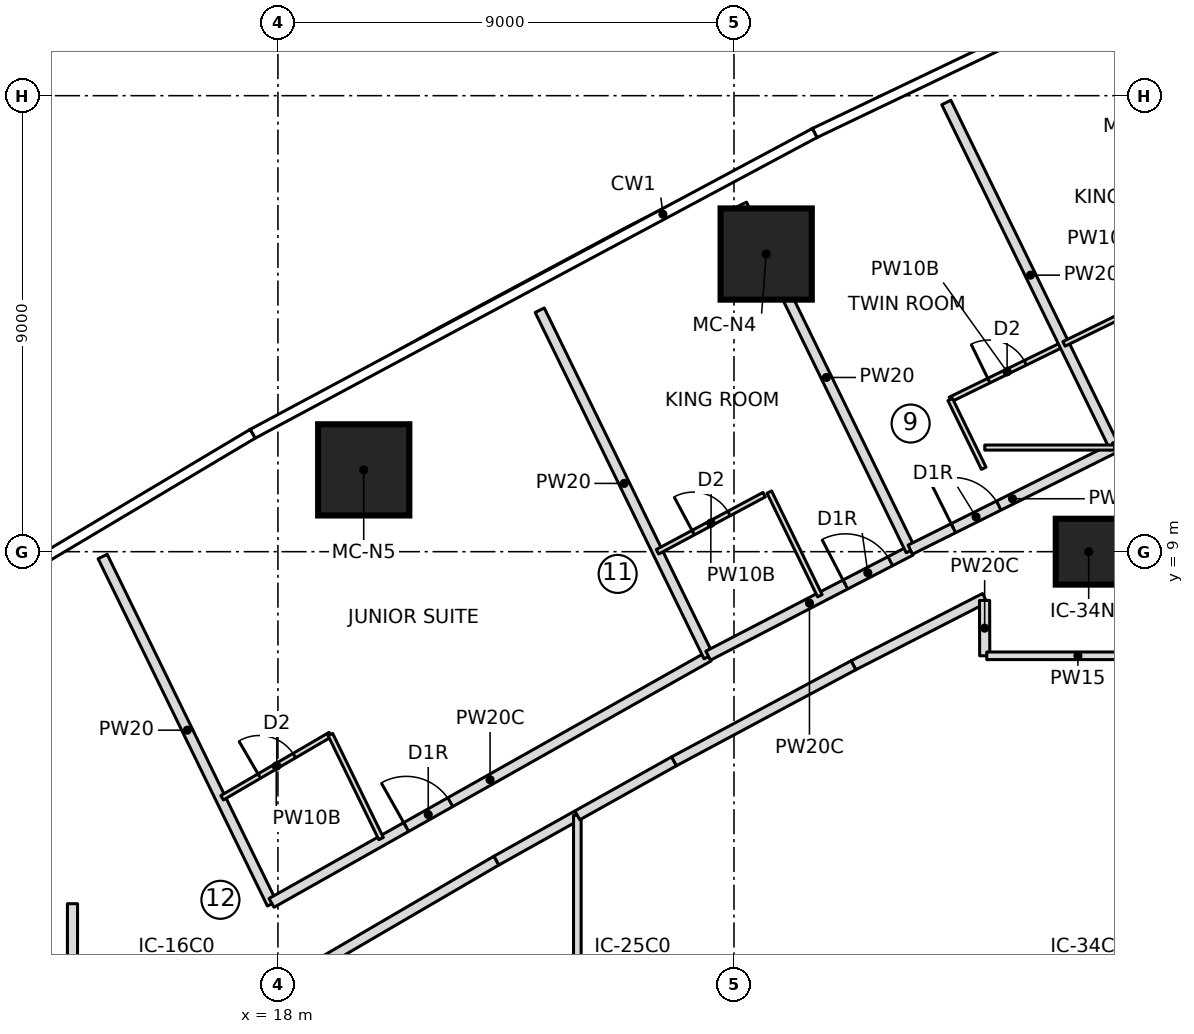
"""IFC4 building model, lengths in metres.
Left out: names, types, materials, properties, quantities, classifications, styles, units other than length and angle.
Written with IfcOpenShell. Run it as: python <this file> out.ifc"""

import sys

from ifc_helpers import new_model, si_unit, direction, frame, frame_2d, origin, origin_2d, place, context, subcontext, project, spatial, rectangle, extrude, element, fill, save


model = new_model("IFC4")
c1 = context("Model", 3, precision=1e-05, world=origin(), true_north=direction((0.0, 1.0)))
c2 = subcontext(c1, "Body", "Model", "MODEL_VIEW")
j1 = project(units=[si_unit("LENGTHUNIT", "METRE"), si_unit("PLANEANGLEUNIT", "RADIAN")], contexts=[c1])
p1 = place(None, origin())
s1 = spatial("IfcSite", under=j1, at=p1, CompositionType="ELEMENT")
p2 = place(p1, origin())
s2 = spatial("IfcBuilding", under=s1, at=p2, CompositionType="ELEMENT")
p3 = place(p2, frame((0.0, 0.0, 39.6)))
s3 = spatial("IfcBuildingStorey", under=s2, at=p3, CompositionType="ELEMENT", Elevation=39.6)
for number, where, z_axis, x_axis in (
    (1, (27.635, 14.874, 0.0), (0.0, 0.0, 1.0), (1.0, 0.0, 0.0)),
    (2, (19.693, 10.615, 0.0), (0.0, 0.0, 1.0), (1.0, 0.0, 0.0)),
):
    element("IfcColumn", number, at=place(p3, frame(where, z_axis=z_axis, x_axis=x_axis)), inside=s3, PredefinedType="COLUMN", context=c2, shape_type="SweptSolid", body=[
        extrude(rectangle(XDim=1.8, YDim=1.8, at=origin_2d()), origin(), (0.0, 0.0, 1.0), 3.55),
    ])
p4 = place(p3, frame((34.0, 9.0, 0.0), z_axis=(0.0, 0.0, 1.0), x_axis=(1.0, 0.0, 0.0)))
e3 = element("IfcColumn", 3, at=p4, inside=s3, PredefinedType="COLUMN", context=c2, shape_type="SweptSolid", body=[
    extrude(rectangle(XDim=1.3, YDim=1.3, at=origin_2d()), origin(), (0.0, 0.0, 1.0), 3.55),
])
p5 = place(p3, frame((17.882, 2.05, 0.0), z_axis=(0.0, 0.0, 1.0), x_axis=(-0.438213564788, 0.898870887078, 0.0)))
e4 = element("IfcWall", 4, at=p5, inside=s3, PredefinedType="PARTITIONING", context=c2, shape_type="SweptSolid", body=[
    extrude(rectangle(XDim=7.625, YDim=0.2, at=frame_2d((3.813, 0.0))), origin(), (0.0, 0.0, 1.0), 3.25),
])
p6 = place(p3, frame((17.874, 2.068, 0.0), z_axis=(0.0, 0.0, 1.0), x_axis=(0.871165632804, 0.490989246544, 0.0)))
e5 = element("IfcWall", 5, at=p6, inside=s3, PredefinedType="PARTITIONING", context=c2, shape_type="SweptSolid", body=[
    extrude(rectangle(XDim=9.901, YDim=0.2, at=frame_2d((4.951, 0.0))), origin(), (0.0, 0.0, 1.0), 3.25),
])
p7 = place(p6, frame((3.05, 0.0, 0.0)))
e6 = element("IfcOpeningElement", 6, at=p7, cuts=e5, PredefinedType="OPENING", context=c2, shape_type="SweptSolid", body=[
    extrude(rectangle(XDim=1.0, YDim=2.1, at=frame_2d((0.5, 1.05))), frame((0.0, 0.11, 0.0), z_axis=(0.0, -1.0, 0.0), x_axis=(1.0, 0.0, 0.0)), (0.0, 0.0, 1.0), 0.22),
])
p8 = place(p3, frame((16.898, 4.144, 0.0), z_axis=(0.0, 0.0, 1.0), x_axis=(0.863707305865, 0.503993739837, 0.0)))
e7 = element("IfcWall", 7, at=p8, inside=s3, PredefinedType="PARTITIONING", context=c2, shape_type="SweptSolid", body=[
    extrude(rectangle(XDim=2.474, YDim=0.1, at=frame_2d((1.237, 0.0))), origin(), (0.0, 0.0, 1.0), 3.25),
])
p9 = place(p8, frame((0.85, 0.0, 0.0)))
e8 = element("IfcOpeningElement", 8, at=p9, cuts=e7, PredefinedType="OPENING", context=c2, shape_type="SweptSolid", body=[
    extrude(rectangle(XDim=0.8, YDim=2.1, at=frame_2d((0.4, 1.05))), frame((0.0, 0.06, 0.0), z_axis=(0.0, -1.0, 0.0), x_axis=(1.0, 0.0, 0.0)), (0.0, 0.0, 1.0), 0.12),
])
p10 = place(p3, frame((19.035, 5.39, 0.0), z_axis=(0.0, 0.0, 1.0), x_axis=(0.438122322582, -0.898915363344, 0.0)))
e9 = element("IfcWall", 9, at=p10, inside=s3, PredefinedType="PARTITIONING", context=c2, shape_type="SweptSolid", body=[
    extrude(rectangle(XDim=2.283, YDim=0.1, at=frame_2d((1.142, 0.0))), origin(), (0.0, 0.0, 1.0), 3.25),
])
p11 = place(p3, frame((26.499, 6.929, 0.0), z_axis=(0.0, 0.0, 1.0), x_axis=(-0.438215539964, 0.898869924146, 0.0)))
e10 = element("IfcWall", 10, at=p11, inside=s3, PredefinedType="PARTITIONING", context=c2, shape_type="SweptSolid", body=[
    extrude(rectangle(XDim=7.605, YDim=0.2, at=frame_2d((3.803, 0.0))), origin(), (0.0, 0.0, 1.0), 3.25),
])
p12 = place(p3, frame((26.49, 6.948, 0.0), z_axis=(0.0, 0.0, 1.0), x_axis=(0.887638836985, 0.460540220911, 0.0)))
e11 = element("IfcWall", 11, at=p12, inside=s3, PredefinedType="PARTITIONING", context=c2, shape_type="SweptSolid", body=[
    extrude(rectangle(XDim=4.504, YDim=0.2, at=frame_2d((2.252, 0.0))), origin(), (0.0, 0.0, 1.0), 3.25),
])
p13 = place(p12, frame((3.05, 0.0, 0.0)))
e12 = element("IfcOpeningElement", 12, at=p13, cuts=e11, PredefinedType="OPENING", context=c2, shape_type="SweptSolid", body=[
    extrude(rectangle(XDim=1.0, YDim=2.1, at=frame_2d((0.5, 1.05))), frame((0.0, 0.11, 0.0), z_axis=(0.0, -1.0, 0.0), x_axis=(1.0, 0.0, 0.0)), (0.0, 0.0, 1.0), 0.22),
])
p14 = place(p3, frame((25.49, 8.998, 0.0), z_axis=(0.0, 0.0, 1.0), x_axis=(0.881666905428, 0.471872300388, 0.0)))
e13 = element("IfcWall", 13, at=p14, inside=s3, PredefinedType="PARTITIONING", context=c2, shape_type="SweptSolid", body=[
    extrude(rectangle(XDim=2.387, YDim=0.1, at=frame_2d((1.194, 0.0))), origin(), (0.0, 0.0, 1.0), 3.25),
])
p15 = place(p14, frame((0.8, 0.0, 0.0)))
e14 = element("IfcOpeningElement", 14, at=p15, cuts=e13, PredefinedType="OPENING", context=c2, shape_type="SweptSolid", body=[
    extrude(rectangle(XDim=0.8, YDim=2.1, at=frame_2d((0.4, 1.05))), frame((0.0, 0.06, 0.0), z_axis=(0.0, -1.0, 0.0), x_axis=(1.0, 0.0, 0.0)), (0.0, 0.0, 1.0), 0.12),
])
p16 = place(p3, frame((27.697, 10.177, 0.0), z_axis=(0.0, 0.0, 1.0), x_axis=(0.438229314017, -0.898863208912, 0.0)))
e15 = element("IfcWall", 15, at=p16, inside=s3, PredefinedType="PARTITIONING", context=c2, shape_type="SweptSolid", body=[
    extrude(rectangle(XDim=2.277, YDim=0.1, at=frame_2d((1.139, 0.0))), origin(), (0.0, 0.0, 1.0), 3.25),
])
p17 = place(p3, frame((30.489, 9.022, 0.0), z_axis=(0.0, 0.0, 1.0), x_axis=(-0.43822365664, 0.898865967072, 0.0)))
e16 = element("IfcWall", 16, at=p17, inside=s3, PredefinedType="PARTITIONING", context=c2, shape_type="SweptSolid", body=[
    extrude(rectangle(XDim=7.601, YDim=0.2, at=frame_2d((3.801, 0.0))), origin(), (0.0, 0.0, 1.0), 3.25),
])
p18 = place(p3, frame((30.48, 9.04, 0.0), z_axis=(0.0, 0.0, 1.0), x_axis=(0.894989913054, 0.446086376761, 0.0)))
e17 = element("IfcWall", 17, at=p18, inside=s3, PredefinedType="PARTITIONING", context=c2, shape_type="SweptSolid", body=[
    extrude(rectangle(XDim=4.506, YDim=0.2, at=frame_2d((2.253, 0.0))), origin(), (0.0, 0.0, 1.0), 3.25),
])
p19 = place(p18, frame((0.95, 0.0, 0.0)))
e18 = element("IfcOpeningElement", 18, at=p19, cuts=e17, PredefinedType="OPENING", context=c2, shape_type="SweptSolid", body=[
    extrude(rectangle(XDim=1.0, YDim=2.1, at=frame_2d((0.5, 1.05))), frame((0.0, 0.11, 0.0), z_axis=(0.0, -1.0, 0.0), x_axis=(1.0, 0.0, 0.0)), (0.0, 0.0, 1.0), 0.22),
])
p20 = place(p3, frame((31.267, 12.003, 0.0), z_axis=(0.0, 0.0, 1.0), x_axis=(0.89845285455, 0.439070003702, 0.0)))
e19 = element("IfcWall", 19, at=p20, inside=s3, PredefinedType="PARTITIONING", context=c2, shape_type="SweptSolid", body=[
    extrude(rectangle(XDim=2.5, YDim=0.1, at=frame_2d((1.25, 0.0))), origin(), (0.0, 0.0, 1.0), 3.25),
])
p21 = place(p20, frame((0.85, 0.0, 0.0)))
e20 = element("IfcOpeningElement", 20, at=p21, cuts=e19, PredefinedType="OPENING", context=c2, shape_type="SweptSolid", body=[
    extrude(rectangle(XDim=0.8, YDim=2.1, at=frame_2d((0.4, 1.05))), frame((0.0, 0.06, 0.0), z_axis=(0.0, -1.0, 0.0), x_axis=(1.0, 0.0, 0.0)), (0.0, 0.0, 1.0), 0.12),
])
p22 = place(p3, frame((31.929, 10.646, 0.0), z_axis=(0.0, 0.0, 1.0), x_axis=(-0.438136931394, 0.898908243008, 0.0)))
e21 = element("IfcWall", 21, at=p22, inside=s3, PredefinedType="PARTITIONING", context=c2, shape_type="SweptSolid", body=[
    extrude(rectangle(XDim=1.51, YDim=0.1, at=frame_2d((0.755, 0.0))), origin(), (0.0, 0.0, 1.0), 3.25),
])
p23 = place(p3, frame((34.513, 11.05, 0.0), z_axis=(0.0, 0.0, 1.0), x_axis=(-0.438187612283, 0.898883538865, 0.0)))
e22 = element("IfcWall", 22, at=p23, inside=s3, PredefinedType="PARTITIONING", context=c2, shape_type="SweptSolid", body=[
    extrude(rectangle(XDim=7.582, YDim=0.2, at=frame_2d((3.791, 0.0))), origin(), (0.0, 0.0, 1.0), 3.25),
])
p24 = place(p3, frame((38.585, 12.981, 0.0), z_axis=(0.0, 0.0, 1.0), x_axis=(-0.903706948966, -0.428151550727, 0.0)))
e23 = element("IfcWall", 23, at=p24, inside=s3, PredefinedType="PARTITIONING", context=c2, shape_type="SweptSolid", body=[
    extrude(rectangle(XDim=4.506, YDim=0.2, at=frame_2d((2.253, 0.0))), origin(), (0.0, 0.0, 1.0), 3.25),
])
p25 = place(p24, frame((0.5, 0.0, 0.0)))
e24 = element("IfcOpeningElement", 24, at=p25, cuts=e23, PredefinedType="OPENING", context=c2, shape_type="SweptSolid", body=[
    extrude(rectangle(XDim=1.0, YDim=2.1, at=frame_2d((0.5, 1.05))), frame((0.0, 0.11, 0.0), z_axis=(0.0, -1.0, 0.0), x_axis=(1.0, 0.0, 0.0)), (0.0, 0.0, 1.0), 0.22),
])
p26 = place(p3, frame((33.513, 13.101, 0.0), z_axis=(0.0, 0.0, 1.0), x_axis=(0.898338680123, 0.439303557685, 0.0)))
e25 = element("IfcWall", 25, at=p26, inside=s3, PredefinedType="PARTITIONING", context=c2, shape_type="SweptSolid", body=[
    extrude(rectangle(XDim=1.547, YDim=0.1, at=frame_2d((0.773, 0.0))), origin(), (0.0, 0.0, 1.0), 3.25),
])
p27 = place(p3, frame((18.844, 0.879, 0.0), z_axis=(0.0, 0.0, 1.0), x_axis=(0.863710538269, 0.503988200341, 0.0)))
e26 = element("IfcWall", 26, at=p27, inside=s3, PredefinedType="PARTITIONING", context=c2, shape_type="SweptSolid", body=[
    extrude(rectangle(XDim=4.016, YDim=0.2, at=frame_2d((2.008, 0.0))), origin(), (0.0, 0.0, 1.0), 3.25),
])
p28 = place(p3, frame((22.312, 2.903, 0.0), z_axis=(0.0, 0.0, 1.0), x_axis=(0.872813072418, 0.48805464921, 0.0)))
e27 = element("IfcWall", 27, at=p28, inside=s3, PredefinedType="PARTITIONING", context=c2, shape_type="SweptSolid", body=[
    extrude(rectangle(XDim=1.829, YDim=0.2, at=frame_2d((0.915, 0.0))), origin(), (0.0, 0.0, 1.0), 3.25),
])
p29 = place(p3, frame((23.909, -3.796, 0.0), z_axis=(0.0, 0.0, 1.0), x_axis=(0.0, 1.0, 0.0)))
e28 = element("IfcWall", 28, at=p29, inside=s3, PredefinedType="PARTITIONING", context=c2, shape_type="SweptSolid", body=[
    extrude(rectangle(XDim=7.592, YDim=0.15, at=frame_2d((3.796, 0.0))), origin(), (0.0, 0.0, 1.0), 3.25),
])
p30 = place(p3, frame((29.357, 6.758, 0.0), z_axis=(0.0, 0.0, 1.0), x_axis=(0.890213377055, 0.455543788579, 0.0)))
e29 = element("IfcWall", 29, at=p30, inside=s3, PredefinedType="PARTITIONING", context=c2, shape_type="SweptSolid", body=[
    extrude(rectangle(XDim=2.912, YDim=0.2, at=frame_2d((1.456, 0.0))), origin(), (0.0, 0.0, 1.0), 3.25),
])
p31 = place(p3, frame((23.909, 3.796, 0.0), z_axis=(0.0, 0.0, 1.0), x_axis=(0.872789592901, 0.48809663646, 0.0)))
e30 = element("IfcWall", 30, at=p31, inside=s3, PredefinedType="PARTITIONING", context=c2, shape_type="SweptSolid", body=[
    extrude(rectangle(XDim=2.186, YDim=0.2, at=frame_2d((1.093, 0.0))), origin(), (0.0, 0.0, 1.0), 3.25),
])
p32 = place(p3, frame((25.817, 4.863, 0.0), z_axis=(0.0, 0.0, 1.0), x_axis=(0.881655245922, 0.471894084874, 0.0)))
e31 = element("IfcWall", 31, at=p32, inside=s3, PredefinedType="PARTITIONING", context=c2, shape_type="SweptSolid", body=[
    extrude(rectangle(XDim=4.016, YDim=0.2, at=frame_2d((2.008, 0.0))), origin(), (0.0, 0.0, 1.0), 3.25),
])
p33 = place(p3, frame((34.51, 11.055, 0.0), z_axis=(0.0, 0.0, 1.0), x_axis=(-1.0, 0.0, 0.0)))
e32 = element("IfcWall", 32, at=p33, inside=s3, PredefinedType="PARTITIONING", context=c2, shape_type="SweptSolid", body=[
    extrude(rectangle(XDim=2.562, YDim=0.1, at=frame_2d((1.281, 0.0))), origin(), (0.0, 0.0, 1.0), 3.25),
])
p34 = place(p3, frame((31.945, 8.037, 0.0), z_axis=(0.0, 0.0, 1.0), x_axis=(0.003129875123, -0.999995101929, 0.0)))
e33 = element("IfcWall", 33, at=p34, inside=s3, PredefinedType="PARTITIONING", context=c2, shape_type="SweptSolid", body=[
    extrude(rectangle(XDim=1.092, YDim=0.2, at=frame_2d((0.546, 0.0))), origin(), (0.0, 0.0, 1.0), 3.25),
])
p35 = place(p3, frame((31.989, 6.945, 0.0), z_axis=(0.0, 0.0, 1.0), x_axis=(0.999999997697, -6.786102e-05, 0.0)))
e34 = element("IfcWall", 34, at=p35, inside=s3, PredefinedType="PARTITIONING", context=c2, shape_type="SweptSolid", body=[
    extrude(rectangle(XDim=3.598, YDim=0.15, at=frame_2d((1.799, 0.0))), origin(), (0.0, 0.0, 1.0), 3.25),
])
p36 = place(p3, frame((13.946, 2.052, 0.0), z_axis=(0.0, 0.0, 1.0), x_axis=(-0.000423818568, -0.999999910189, 0.0)))
e35 = element("IfcWall", 35, at=p36, inside=s3, PredefinedType="PARTITIONING", context=c2, shape_type="SweptSolid", body=[
    extrude(rectangle(XDim=1.152, YDim=0.2, at=frame_2d((0.576, 0.0))), origin(), (0.0, 0.0, 1.0), 3.25),
])
p37 = place(p9, origin())
e36 = element("IfcDoor", 36, at=p37, inside=s3, OperationType="SINGLE_SWING_LEFT", PredefinedType="DOOR", context=c2, shape_type="SweptSolid", body=[
    extrude(rectangle(XDim=0.8, YDim=2.1, at=frame_2d((0.4, 1.05))), frame((0.0, 0.025, 0.0), z_axis=(0.0, -1.0, 0.0), x_axis=(1.0, 0.0, 0.0)), (0.0, 0.0, 1.0), 0.05),
])
fill(e8, e36)
p38 = place(p7, origin())
e37 = element("IfcDoor", 37, at=p38, inside=s3, OperationType="SINGLE_SWING_RIGHT", PredefinedType="DOOR", context=c2, shape_type="SweptSolid", body=[
    extrude(rectangle(XDim=1.0, YDim=2.1, at=frame_2d((0.5, 1.05))), frame((0.0, 0.025, 0.0), z_axis=(0.0, -1.0, 0.0), x_axis=(1.0, 0.0, 0.0)), (0.0, 0.0, 1.0), 0.05),
])
fill(e6, e37)
p39 = place(p15, origin())
e38 = element("IfcDoor", 38, at=p39, inside=s3, OperationType="SINGLE_SWING_LEFT", PredefinedType="DOOR", context=c2, shape_type="SweptSolid", body=[
    extrude(rectangle(XDim=0.8, YDim=2.1, at=frame_2d((0.4, 1.05))), frame((0.0, 0.025, 0.0), z_axis=(0.0, -1.0, 0.0), x_axis=(1.0, 0.0, 0.0)), (0.0, 0.0, 1.0), 0.05),
])
fill(e14, e38)
p40 = place(p13, origin())
e39 = element("IfcDoor", 39, at=p40, inside=s3, OperationType="SINGLE_SWING_RIGHT", PredefinedType="DOOR", context=c2, shape_type="SweptSolid", body=[
    extrude(rectangle(XDim=1.0, YDim=2.1, at=frame_2d((0.5, 1.05))), frame((0.0, 0.025, 0.0), z_axis=(0.0, -1.0, 0.0), x_axis=(1.0, 0.0, 0.0)), (0.0, 0.0, 1.0), 0.05),
])
fill(e12, e39)
p41 = place(p21, origin())
e40 = element("IfcDoor", 40, at=p41, inside=s3, OperationType="SINGLE_SWING_LEFT", PredefinedType="DOOR", context=c2, shape_type="SweptSolid", body=[
    extrude(rectangle(XDim=0.8, YDim=2.1, at=frame_2d((0.4, 1.05))), frame((0.0, 0.025, 0.0), z_axis=(0.0, -1.0, 0.0), x_axis=(1.0, 0.0, 0.0)), (0.0, 0.0, 1.0), 0.05),
])
fill(e20, e40)
p42 = place(p19, origin())
e41 = element("IfcDoor", 41, at=p42, inside=s3, OperationType="SINGLE_SWING_RIGHT", PredefinedType="DOOR", context=c2, shape_type="SweptSolid", body=[
    extrude(rectangle(XDim=1.0, YDim=2.1, at=frame_2d((0.5, 1.05))), frame((0.0, 0.025, 0.0), z_axis=(0.0, -1.0, 0.0), x_axis=(1.0, 0.0, 0.0)), (0.0, 0.0, 1.0), 0.05),
])
fill(e18, e41)
save(model, sys.argv[1])
